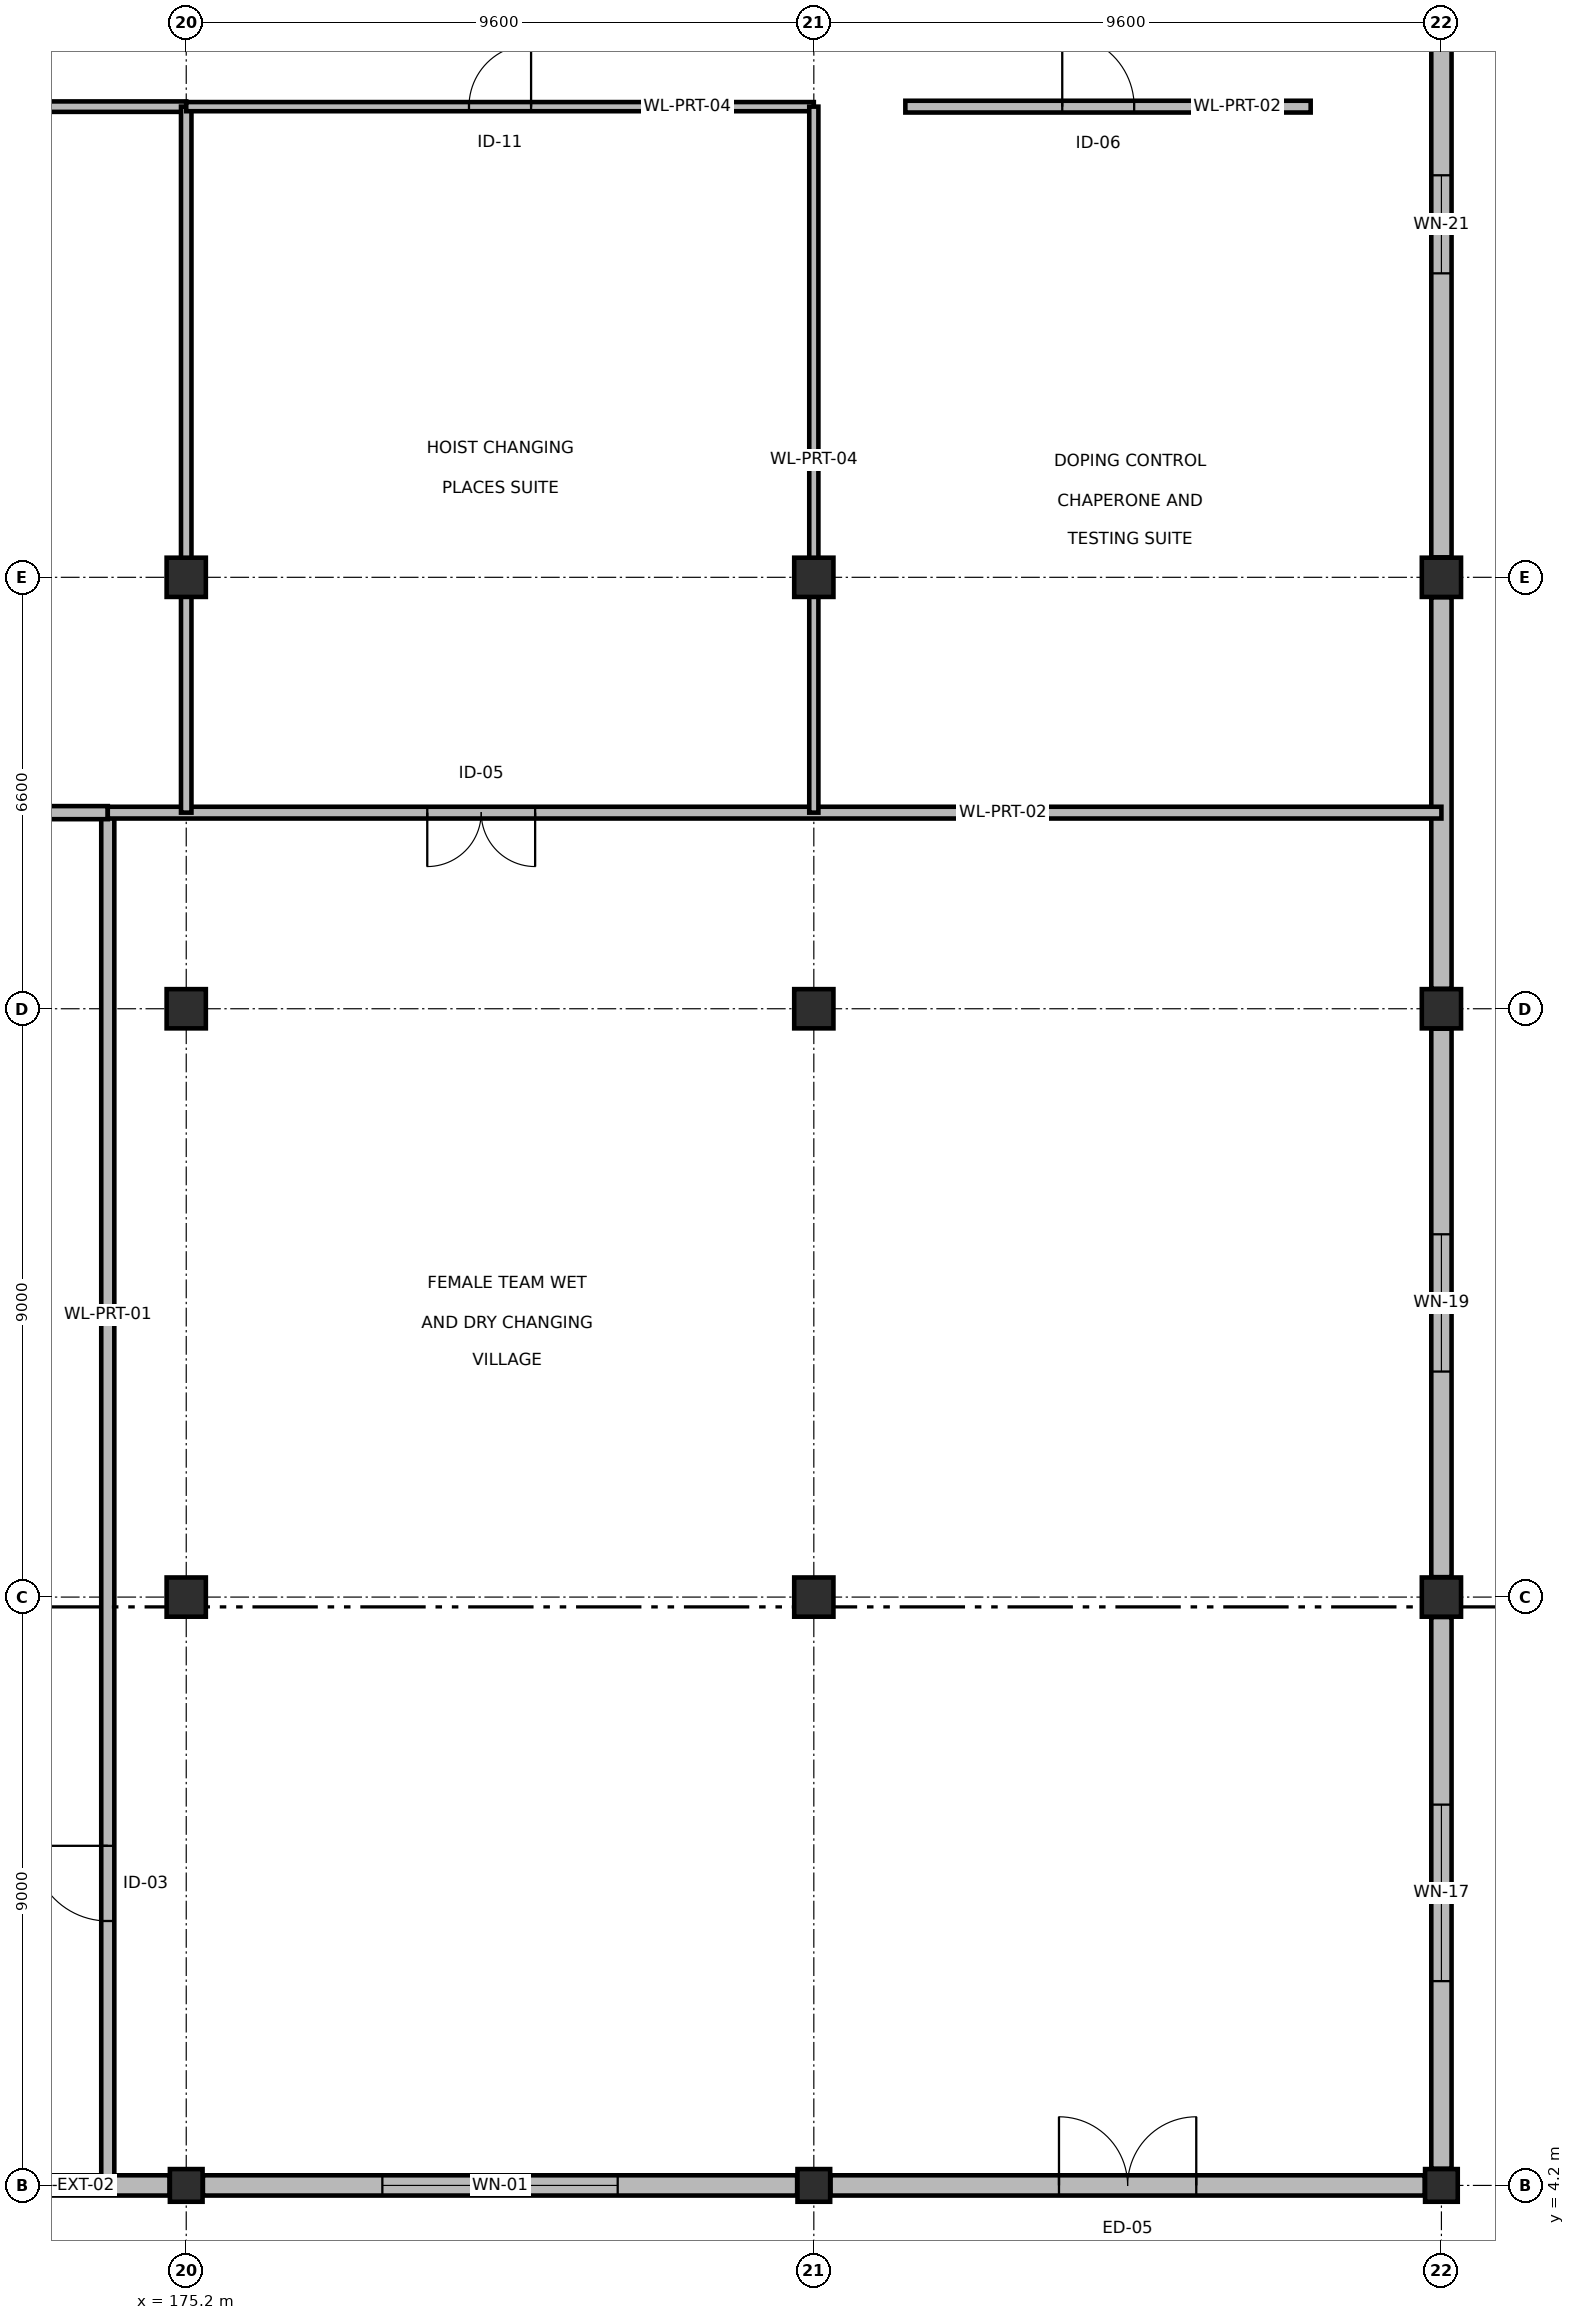
"""IFC4 building model, lengths in metres.
Left out: names, types, materials, properties, quantities, classifications, styles, units other than length and angle.
Written with IfcOpenShell. Run it as: python <this file> out.ifc"""

import sys

from ifc_helpers import new_model, si_unit, direction, frame, frame_2d, origin, origin_2d, place, context, subcontext, project, spatial, rectangle, extrude, element, fill, save


model = new_model("IFC4")
c1 = context("Model", 3, precision=1e-05, world=origin(), true_north=direction((0.0, 1.0)))
c2 = subcontext(c1, "Body", "Model", "MODEL_VIEW")
j1 = project(units=[si_unit("LENGTHUNIT", "METRE"), si_unit("PLANEANGLEUNIT", "RADIAN")], contexts=[c1])
p1 = place(None, origin())
s1 = spatial("IfcSite", under=j1, at=p1, CompositionType="ELEMENT")
p2 = place(p1, origin())
s2 = spatial("IfcBuilding", under=s1, at=p2, CompositionType="ELEMENT")
p3 = place(p2, origin())
s3 = spatial("IfcBuildingStorey", under=s2, at=p3, CompositionType="ELEMENT", Elevation=0.0)
for number, where, z_axis, x_axis in (
    (1, (175.2, 13.2, 0.0), (0.0, 0.0, 1.0), (1.0, 0.0, 0.0)),
    (2, (175.2, 22.2, 0.0), (0.0, 0.0, 1.0), (1.0, 0.0, 0.0)),
    (3, (175.2, 28.8, 0.0), (0.0, 0.0, 1.0), (1.0, 0.0, 0.0)),
    (4, (184.8, 13.2, 0.0), (0.0, 0.0, 1.0), (1.0, 0.0, 0.0)),
    (5, (184.8, 22.2, 0.0), (0.0, 0.0, 1.0), (1.0, 0.0, 0.0)),
    (6, (184.8, 28.8, 0.0), (0.0, 0.0, 1.0), (1.0, 0.0, 0.0)),
    (7, (194.4, 13.2, 0.0), (0.0, 0.0, 1.0), (1.0, 0.0, 0.0)),
    (8, (194.4, 22.2, 0.0), (0.0, 0.0, 1.0), (1.0, 0.0, 0.0)),
    (9, (194.4, 28.8, 0.0), (0.0, 0.0, 1.0), (1.0, 0.0, 0.0)),
):
    element("IfcColumn", number, at=place(p3, frame(where, z_axis=z_axis, x_axis=x_axis)), inside=s3, PredefinedType="COLUMN", context=c2, shape_type="SweptSolid", body=[
        extrude(rectangle(XDim=0.6, YDim=0.6, at=origin_2d()), origin(), (0.0, 0.0, 1.0), 4.8),
    ])
for number, where, z_axis, x_axis in (
    (10, (175.2, 4.2, 0.0), (0.0, 0.0, 1.0), (1.0, 0.0, 0.0)),
    (11, (184.8, 4.2, 0.0), (0.0, 0.0, 1.0), (1.0, 0.0, 0.0)),
    (12, (194.4, 4.2, 0.0), (0.0, 0.0, 1.0), (1.0, 0.0, 0.0)),
):
    element("IfcColumn", number, at=place(p3, frame(where, z_axis=z_axis, x_axis=x_axis)), inside=s3, PredefinedType="COLUMN", context=c2, shape_type="SweptSolid", body=[
        extrude(rectangle(XDim=0.5, YDim=0.5, at=origin_2d()), origin(), (0.0, 0.0, 1.0), 4.8),
    ])
p4 = place(p3, frame((174.945, 4.2, 0.0), z_axis=(0.0, 0.0, 1.0), x_axis=(-1.0, 0.0, 0.0)))
e13 = element("IfcWall", 13, at=p4, inside=s3, PredefinedType="SOLIDWALL", context=c2, shape_type="SweptSolid", body=[
    extrude(rectangle(XDim=9.09, YDim=0.31, at=frame_2d((4.545, 0.0))), origin(), (0.0, 0.0, 1.0), 3.825),
])
p5 = place(p4, frame((3.495, 0.0, 0.0)))
e14 = element("IfcOpeningElement", 14, at=p5, cuts=e13, PredefinedType="OPENING", context=c2, shape_type="SweptSolid", body=[
    extrude(rectangle(XDim=2.1, YDim=2.4, at=frame_2d((1.05, 1.2))), frame((0.0, 0.165, 0.0), z_axis=(0.0, -1.0, 0.0), x_axis=(1.0, 0.0, 0.0)), (0.0, 0.0, 1.0), 0.33),
])
p6 = place(p3, frame((184.545, 4.2, 0.0), z_axis=(0.0, 0.0, 1.0), x_axis=(-1.0, 0.0, 0.0)))
e15 = element("IfcWall", 15, at=p6, inside=s3, PredefinedType="SOLIDWALL", context=c2, shape_type="SweptSolid", body=[
    extrude(rectangle(XDim=9.09, YDim=0.31, at=frame_2d((4.545, 0.0))), origin(), (0.0, 0.0, 1.0), 3.825),
])
p7 = place(p6, frame((2.745, 0.0, 2.2)))
e16 = element("IfcOpeningElement", 16, at=p7, cuts=e15, PredefinedType="OPENING", context=c2, shape_type="SweptSolid", body=[
    extrude(rectangle(XDim=3.6, YDim=0.9, at=frame_2d((1.8, 0.45))), frame((0.0, 0.165, 0.0), z_axis=(0.0, -1.0, 0.0), x_axis=(1.0, 0.0, 0.0)), (0.0, 0.0, 1.0), 0.33),
])
p8 = place(p3, frame((194.145, 4.2, 0.0), z_axis=(0.0, 0.0, 1.0), x_axis=(-1.0, 0.0, 0.0)))
e17 = element("IfcWall", 17, at=p8, inside=s3, PredefinedType="SOLIDWALL", context=c2, shape_type="SweptSolid", body=[
    extrude(rectangle(XDim=9.09, YDim=0.31, at=frame_2d((4.545, 0.0))), origin(), (0.0, 0.0, 1.0), 3.825),
])
p9 = place(p8, frame((3.495, 0.0, 0.0)))
e18 = element("IfcOpeningElement", 18, at=p9, cuts=e17, PredefinedType="OPENING", context=c2, shape_type="SweptSolid", body=[
    extrude(rectangle(XDim=2.1, YDim=2.4, at=frame_2d((1.05, 1.2))), frame((0.0, 0.165, 0.0), z_axis=(0.0, -1.0, 0.0), x_axis=(1.0, 0.0, 0.0)), (0.0, 0.0, 1.0), 0.33),
])
p10 = place(p3, frame((194.4, 12.895, 0.0), z_axis=(0.0, 0.0, 1.0), x_axis=(0.0, -1.0, 0.0)))
e19 = element("IfcWall", 19, at=p10, inside=s3, PredefinedType="SOLIDWALL", context=c2, shape_type="SweptSolid", body=[
    extrude(rectangle(XDim=8.44, YDim=0.31, at=frame_2d((4.22, 0.0))), origin(), (0.0, 0.0, 1.0), 3.825),
])
p11 = place(p10, frame((2.87, 0.0, 0.85)))
e20 = element("IfcOpeningElement", 20, at=p11, cuts=e19, PredefinedType="OPENING", context=c2, shape_type="SweptSolid", body=[
    extrude(rectangle(XDim=2.7, YDim=1.8, at=frame_2d((1.35, 0.9))), frame((0.0, 0.165, 0.0), z_axis=(0.0, -1.0, 0.0), x_axis=(1.0, 0.0, 0.0)), (0.0, 0.0, 1.0), 0.33),
])
p12 = place(p3, frame((194.4, 21.895, 0.0), z_axis=(0.0, 0.0, 1.0), x_axis=(0.0, -1.0, 0.0)))
e21 = element("IfcWall", 21, at=p12, inside=s3, PredefinedType="SOLIDWALL", context=c2, shape_type="SweptSolid", body=[
    extrude(rectangle(XDim=8.39, YDim=0.31, at=frame_2d((4.195, 0.0))), origin(), (0.0, 0.0, 1.0), 3.825),
])
p13 = place(p12, frame((3.145, 0.0, 0.85)))
e22 = element("IfcOpeningElement", 22, at=p13, cuts=e21, PredefinedType="OPENING", context=c2, shape_type="SweptSolid", body=[
    extrude(rectangle(XDim=2.1, YDim=1.8, at=frame_2d((1.05, 0.9))), frame((0.0, 0.165, 0.0), z_axis=(0.0, -1.0, 0.0), x_axis=(1.0, 0.0, 0.0)), (0.0, 0.0, 1.0), 0.33),
])
p14 = place(p3, frame((194.4, 28.495, 0.0), z_axis=(0.0, 0.0, 1.0), x_axis=(0.0, -1.0, 0.0)))
e23 = element("IfcWall", 23, at=p14, inside=s3, PredefinedType="SOLIDWALL", context=c2, shape_type="SweptSolid", body=[
    extrude(rectangle(XDim=5.99, YDim=0.31, at=frame_2d((2.995, 0.0))), origin(), (0.0, 0.0, 1.0), 3.825),
])
p15 = place(p3, frame((194.4, 39.295, 0.0), z_axis=(0.0, 0.0, 1.0), x_axis=(0.0, -1.0, 0.0)))
e24 = element("IfcWall", 24, at=p15, inside=s3, PredefinedType="SOLIDWALL", context=c2, shape_type="SweptSolid", body=[
    extrude(rectangle(XDim=10.19, YDim=0.31, at=frame_2d((5.095, 0.0))), origin(), (0.0, 0.0, 1.0), 3.825),
])
p16 = place(p15, frame((4.345, 0.0, 0.85)))
e25 = element("IfcOpeningElement", 25, at=p16, cuts=e24, PredefinedType="OPENING", context=c2, shape_type="SweptSolid", body=[
    extrude(rectangle(XDim=1.5, YDim=1.8, at=frame_2d((0.75, 0.9))), frame((0.0, 0.165, 0.0), z_axis=(0.0, -1.0, 0.0), x_axis=(1.0, 0.0, 0.0)), (0.0, 0.0, 1.0), 0.33),
])
p17 = place(p3, frame((186.2, 36.0, 0.0), z_axis=(0.0, 0.0, 1.0), x_axis=(1.0, 0.0, 0.0)))
e26 = element("IfcWall", 26, at=p17, inside=s3, PredefinedType="PARTITIONING", context=c2, shape_type="SweptSolid", body=[
    extrude(rectangle(XDim=6.2, YDim=0.18, at=frame_2d((3.1, 0.0))), origin(), (0.0, 0.0, 1.0), 4.385),
])
p18 = place(p17, frame((2.4, 0.0, 0.0)))
e27 = element("IfcOpeningElement", 27, at=p18, cuts=e26, PredefinedType="OPENING", context=c2, shape_type="SweptSolid", body=[
    extrude(rectangle(XDim=1.1, YDim=2.15, at=frame_2d((0.55, 1.075))), frame((0.0, 0.1, 0.0), z_axis=(0.0, -1.0, 0.0), x_axis=(1.0, 0.0, 0.0)), (0.0, 0.0, 1.0), 0.2),
])
p19 = place(p3, frame((174.0, 4.2, 0.0), z_axis=(0.0, 0.0, 1.0), x_axis=(0.0, 1.0, 0.0)))
e28 = element("IfcWall", 28, at=p19, inside=s3, PredefinedType="PARTITIONING", context=c2, shape_type="SweptSolid", body=[
    extrude(rectangle(XDim=21.0, YDim=0.2, at=frame_2d((10.5, 0.0))), origin(), (0.0, 0.0, 1.0), 3.825),
])
p20 = place(p19, frame((4.045, 0.0, 0.0)))
e29 = element("IfcOpeningElement", 29, at=p20, cuts=e28, PredefinedType="OPENING", context=c2, shape_type="SweptSolid", body=[
    extrude(rectangle(XDim=1.15, YDim=2.2, at=frame_2d((0.575, 1.1))), frame((0.0, 0.11, 0.0), z_axis=(0.0, -1.0, 0.0), x_axis=(1.0, 0.0, 0.0)), (0.0, 0.0, 1.0), 0.22),
])
p21 = place(p3, frame((156.0, 25.2, 0.0), z_axis=(0.0, 0.0, 1.0), x_axis=(1.0, 0.0, 0.0)))
e30 = element("IfcWall", 30, at=p21, inside=s3, PredefinedType="PARTITIONING", context=c2, shape_type="SweptSolid", body=[
    extrude(rectangle(XDim=18.0, YDim=0.2, at=frame_2d((9.0, 0.0))), origin(), (0.0, 0.0, 1.0), 3.825),
])
p22 = place(p3, frame((174.0, 25.2, 0.0), z_axis=(0.0, 0.0, 1.0), x_axis=(1.0, 0.0, 0.0)))
e31 = element("IfcWall", 31, at=p22, inside=s3, PredefinedType="PARTITIONING", context=c2, shape_type="SweptSolid", body=[
    extrude(rectangle(XDim=20.4, YDim=0.18, at=frame_2d((10.2, 0.0))), origin(), (0.0, 0.0, 1.0), 3.825),
])
p23 = place(p22, frame((4.887, 0.0, 0.0)))
e32 = element("IfcOpeningElement", 32, at=p23, cuts=e31, PredefinedType="OPENING", context=c2, shape_type="SweptSolid", body=[
    extrude(rectangle(XDim=1.65, YDim=2.2, at=frame_2d((0.825, 1.1))), frame((0.0, 0.1, 0.0), z_axis=(0.0, -1.0, 0.0), x_axis=(1.0, 0.0, 0.0)), (0.0, 0.0, 1.0), 0.2),
])
p24 = place(p3, frame((156.0, 36.0, 0.0), z_axis=(0.0, 0.0, 1.0), x_axis=(1.0, 0.0, 0.0)))
e33 = element("IfcWall", 33, at=p24, inside=s3, PredefinedType="PARTITIONING", context=c2, shape_type="SweptSolid", body=[
    extrude(rectangle(XDim=19.2, YDim=0.16, at=frame_2d((9.6, 0.0))), origin(), (0.0, 0.0, 1.0), 3.775),
])
p25 = place(p24, frame((4.826, 0.0, 0.0)))
e34 = element("IfcOpeningElement", 34, at=p25, cuts=e33, PredefinedType="OPENING", context=c2, shape_type="SweptSolid", body=[
    extrude(rectangle(XDim=1.1, YDim=2.15, at=frame_2d((0.55, 1.075))), frame((0.0, 0.09, 0.0), z_axis=(0.0, -1.0, 0.0), x_axis=(1.0, 0.0, 0.0)), (0.0, 0.0, 1.0), 0.18),
])
p26 = place(p3, frame((175.2, 25.2, 0.0), z_axis=(0.0, 0.0, 1.0), x_axis=(0.0, 1.0, 0.0)))
e35 = element("IfcWall", 35, at=p26, inside=s3, PredefinedType="PARTITIONING", context=c2, shape_type="SweptSolid", body=[
    extrude(rectangle(XDim=10.8, YDim=0.16, at=frame_2d((5.4, 0.0))), origin(), (0.0, 0.0, 1.0), 3.775),
])
p27 = place(p3, frame((175.2, 36.0, 0.0), z_axis=(0.0, 0.0, 1.0), x_axis=(1.0, 0.0, 0.0)))
e36 = element("IfcWall", 36, at=p27, inside=s3, PredefinedType="PARTITIONING", context=c2, shape_type="SweptSolid", body=[
    extrude(rectangle(XDim=9.6, YDim=0.14, at=frame_2d((4.8, 0.0))), origin(), (0.0, 0.0, 1.0), 3.775),
])
p28 = place(p27, frame((4.325, 0.0, 0.0)))
e37 = element("IfcOpeningElement", 37, at=p28, cuts=e36, PredefinedType="OPENING", context=c2, shape_type="SweptSolid", body=[
    extrude(rectangle(XDim=0.95, YDim=2.1, at=frame_2d((0.475, 1.05))), frame((0.0, 0.08, 0.0), z_axis=(0.0, -1.0, 0.0), x_axis=(1.0, 0.0, 0.0)), (0.0, 0.0, 1.0), 0.16),
])
p29 = place(p3, frame((184.8, 25.2, 0.0), z_axis=(0.0, 0.0, 1.0), x_axis=(0.0, 1.0, 0.0)))
e38 = element("IfcWall", 38, at=p29, inside=s3, PredefinedType="PARTITIONING", context=c2, shape_type="SweptSolid", body=[
    extrude(rectangle(XDim=10.8, YDim=0.14, at=frame_2d((5.4, 0.0))), origin(), (0.0, 0.0, 1.0), 3.775),
])
p30 = place(p7, origin())
e39 = element("IfcWindow", 39, at=p30, inside=s3, PartitioningType="SINGLE_PANEL", PredefinedType="WINDOW", context=c2, shape_type="SweptSolid", body=[
    extrude(rectangle(XDim=3.6, YDim=0.9, at=frame_2d((1.8, 0.45))), frame((0.0, 0.03, 0.0), z_axis=(0.0, -1.0, 0.0), x_axis=(1.0, 0.0, 0.0)), (0.0, 0.0, 1.0), 0.06),
])
fill(e16, e39)
p31 = place(p9, origin())
e40 = element("IfcDoor", 40, at=p31, inside=s3, OperationType="DOUBLE_DOOR_SINGLE_SWING", PredefinedType="DOOR", context=c2, shape_type="SweptSolid", body=[
    extrude(rectangle(XDim=2.1, YDim=2.4, at=frame_2d((1.05, 1.2))), frame((0.0, 0.025, 0.0), z_axis=(0.0, -1.0, 0.0), x_axis=(1.0, 0.0, 0.0)), (0.0, 0.0, 1.0), 0.05),
])
fill(e18, e40)
p32 = place(p11, origin())
e41 = element("IfcWindow", 41, at=p32, inside=s3, PartitioningType="SINGLE_PANEL", PredefinedType="WINDOW", context=c2, shape_type="SweptSolid", body=[
    extrude(rectangle(XDim=2.7, YDim=1.8, at=frame_2d((1.35, 0.9))), frame((0.0, 0.03, 0.0), z_axis=(0.0, -1.0, 0.0), x_axis=(1.0, 0.0, 0.0)), (0.0, 0.0, 1.0), 0.06),
])
fill(e20, e41)
p33 = place(p13, origin())
e42 = element("IfcWindow", 42, at=p33, inside=s3, PartitioningType="SINGLE_PANEL", PredefinedType="WINDOW", context=c2, shape_type="SweptSolid", body=[
    extrude(rectangle(XDim=2.1, YDim=1.8, at=frame_2d((1.05, 0.9))), frame((0.0, 0.03, 0.0), z_axis=(0.0, -1.0, 0.0), x_axis=(1.0, 0.0, 0.0)), (0.0, 0.0, 1.0), 0.06),
])
fill(e22, e42)
p34 = place(p16, origin())
e43 = element("IfcWindow", 43, at=p34, inside=s3, PartitioningType="SINGLE_PANEL", PredefinedType="WINDOW", context=c2, shape_type="SweptSolid", body=[
    extrude(rectangle(XDim=1.5, YDim=1.8, at=frame_2d((0.75, 0.9))), frame((0.0, 0.03, 0.0), z_axis=(0.0, -1.0, 0.0), x_axis=(1.0, 0.0, 0.0)), (0.0, 0.0, 1.0), 0.06),
])
fill(e25, e43)
p35 = place(p18, origin())
e44 = element("IfcDoor", 44, at=p35, inside=s3, OperationType="SINGLE_SWING_LEFT", PredefinedType="DOOR", context=c2, shape_type="SweptSolid", body=[
    extrude(rectangle(XDim=1.1, YDim=2.15, at=frame_2d((0.55, 1.075))), frame((0.0, 0.025, 0.0), z_axis=(0.0, -1.0, 0.0), x_axis=(1.0, 0.0, 0.0)), (0.0, 0.0, 1.0), 0.05),
])
fill(e27, e44)
p36 = place(p20, origin())
e45 = element("IfcDoor", 45, at=p36, inside=s3, OperationType="SINGLE_SWING_RIGHT", PredefinedType="DOOR", context=c2, shape_type="SweptSolid", body=[
    extrude(rectangle(XDim=1.15, YDim=2.2, at=frame_2d((0.575, 1.1))), frame((0.0, 0.025, 0.0), z_axis=(0.0, -1.0, 0.0), x_axis=(1.0, 0.0, 0.0)), (0.0, 0.0, 1.0), 0.05),
])
fill(e29, e45)
p37 = place(p23, origin())
e46 = element("IfcDoor", 46, at=p37, inside=s3, OperationType="DOUBLE_DOOR_SINGLE_SWING", PredefinedType="DOOR", context=c2, shape_type="SweptSolid", body=[
    extrude(rectangle(XDim=1.65, YDim=2.2, at=frame_2d((0.825, 1.1))), frame((0.0, 0.025, 0.0), z_axis=(0.0, -1.0, 0.0), x_axis=(1.0, 0.0, 0.0)), (0.0, 0.0, 1.0), 0.05),
])
fill(e32, e46)
p38 = place(p28, origin())
e47 = element("IfcDoor", 47, at=p38, inside=s3, OperationType="SINGLE_SWING_RIGHT", PredefinedType="DOOR", context=c2, shape_type="SweptSolid", body=[
    extrude(rectangle(XDim=0.95, YDim=2.1, at=frame_2d((0.475, 1.05))), frame((0.0, 0.025, 0.0), z_axis=(0.0, -1.0, 0.0), x_axis=(1.0, 0.0, 0.0)), (0.0, 0.0, 1.0), 0.05),
])
fill(e37, e47)
save(model, sys.argv[1])
